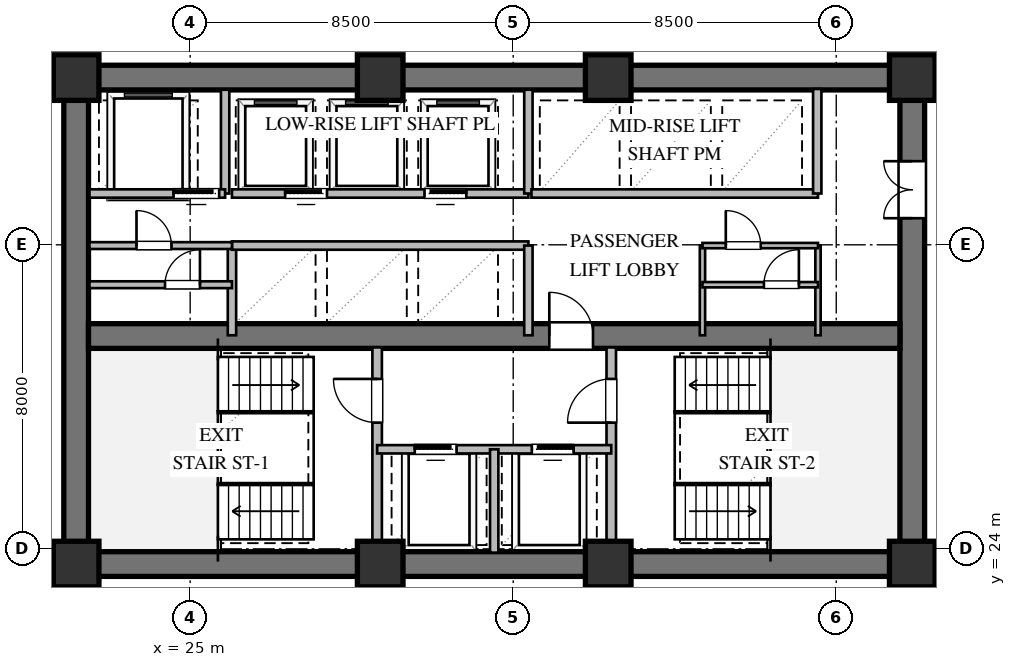
"""IFC4 building model, lengths in metres.
Left out: names, types, materials, properties, quantities, classifications, styles, units other than length and angle.
Written with IfcOpenShell. Run it as: python <this file> out.ifc"""

import sys

from ifc_helpers import new_model, si_unit, direction, frame, frame_2d, origin, origin_2d, place, context, subcontext, project, spatial, rectangle, extrude, element, fill, save


model = new_model("IFC4")
c1 = context("Model", 3, precision=1e-05, world=origin(), true_north=direction((0.0, 1.0)))
c2 = subcontext(c1, "Body", "Model", "MODEL_VIEW")
j1 = project(units=[si_unit("LENGTHUNIT", "METRE"), si_unit("PLANEANGLEUNIT", "RADIAN")], contexts=[c1])
p1 = place(None, origin())
s1 = spatial("IfcSite", under=j1, at=p1, CompositionType="ELEMENT")
p2 = place(p1, origin())
s2 = spatial("IfcBuilding", under=s1, at=p2, CompositionType="ELEMENT")
p3 = place(p2, frame((0.0, 0.0, 42.0)))
s3 = spatial("IfcBuildingStorey", under=s2, at=p3, CompositionType="ELEMENT", Elevation=42.0)
for number, where, z_axis, x_axis in (
    (1, (21.675, 23.6, 0.0), (0.0, 0.0, 1.0), (1.0, 0.0, 0.0)),
    (2, (21.675, 36.4, 0.0), (0.0, 0.0, 1.0), (1.0, 0.0, 0.0)),
):
    element("IfcWall", number, at=place(p3, frame(where, z_axis=z_axis, x_axis=x_axis)), inside=s3, PredefinedType="SHEAR", context=c2, shape_type="SweptSolid", body=[
        extrude(rectangle(XDim=22.65, YDim=0.65, at=frame_2d((11.325, 0.0))), origin(), (0.0, 0.0, 1.0), 3.36),
    ])
p4 = place(p3, frame((22.0, 23.925, 0.0), z_axis=(0.0, 0.0, 1.0), x_axis=(0.0, 1.0, 0.0)))
e3 = element("IfcWall", 3, at=p4, inside=s3, PredefinedType="SHEAR", context=c2, shape_type="SweptSolid", body=[
    extrude(rectangle(XDim=12.15, YDim=0.65, at=frame_2d((6.075, 0.0))), origin(), (0.0, 0.0, 1.0), 3.36),
])
p5 = place(p3, frame((44.0, 23.925, 0.0), z_axis=(0.0, 0.0, 1.0), x_axis=(0.0, 1.0, 0.0)))
e4 = element("IfcWall", 4, at=p5, inside=s3, PredefinedType="SHEAR", context=c2, shape_type="SweptSolid", body=[
    extrude(rectangle(XDim=12.15, YDim=0.65, at=frame_2d((6.075, 0.0))), origin(), (0.0, 0.0, 1.0), 3.36),
])
p6 = place(p5, frame((8.775, 0.0, 0.0)))
e5 = element("IfcOpeningElement", 5, at=p6, cuts=e4, PredefinedType="OPENING", context=c2, shape_type="SweptSolid", body=[
    extrude(rectangle(XDim=1.5, YDim=2.15, at=frame_2d((0.75, 1.075))), frame((0.0, 0.335, 0.0), z_axis=(0.0, -1.0, 0.0), x_axis=(1.0, 0.0, 0.0)), (0.0, 0.0, 1.0), 0.67),
])
p7 = place(p3, frame((22.325, 29.6, 0.0), z_axis=(0.0, 0.0, 1.0), x_axis=(1.0, 0.0, 0.0)))
e6 = element("IfcWall", 6, at=p7, inside=s3, PredefinedType="SHEAR", context=c2, shape_type="SweptSolid", body=[
    extrude(rectangle(XDim=21.35, YDim=0.65, at=frame_2d((10.675, 0.0))), origin(), (0.0, 0.0, 1.0), 3.36),
])
p8 = place(p7, frame((12.125, 0.0, 0.0)))
e7 = element("IfcOpeningElement", 7, at=p8, cuts=e6, PredefinedType="OPENING", context=c2, shape_type="SweptSolid", body=[
    extrude(rectangle(XDim=1.15, YDim=2.1, at=frame_2d((0.575, 1.05))), frame((0.0, 0.335, 0.0), z_axis=(0.0, -1.0, 0.0), x_axis=(1.0, 0.0, 0.0)), (0.0, 0.0, 1.0), 0.67),
])
for number, where, z_axis, x_axis in (
    (8, (22.0, 23.6, 0.0), (0.0, 0.0, 1.0), (1.0, 0.0, 0.0)),
    (9, (30.0, 23.6, 0.0), (0.0, 0.0, 1.0), (1.0, 0.0, 0.0)),
    (10, (36.0, 23.6, 0.0), (0.0, 0.0, 1.0), (1.0, 0.0, 0.0)),
    (11, (44.0, 23.6, 0.0), (0.0, 0.0, 1.0), (1.0, 0.0, 0.0)),
    (12, (44.0, 36.4, 0.0), (0.0, 0.0, 1.0), (1.0, 0.0, 0.0)),
    (13, (36.0, 36.4, 0.0), (0.0, 0.0, 1.0), (1.0, 0.0, 0.0)),
    (14, (30.0, 36.4, 0.0), (0.0, 0.0, 1.0), (1.0, 0.0, 0.0)),
    (15, (22.0, 36.4, 0.0), (0.0, 0.0, 1.0), (1.0, 0.0, 0.0)),
):
    element("IfcColumn", number, at=place(p3, frame(where, z_axis=z_axis, x_axis=x_axis)), inside=s3, PredefinedType="COLUMN", context=c2, shape_type="SweptSolid", body=[
        extrude(rectangle(XDim=1.2, YDim=1.2, at=origin_2d()), origin(), (0.0, 0.0, 1.0), 3.6),
    ])
p9 = place(p3, frame((29.92, 23.9, 0.0), z_axis=(0.0, 0.0, 1.0), x_axis=(0.0, 1.0, 0.0)))
e16 = element("IfcWall", 16, at=p9, inside=s3, PredefinedType="SOLIDWALL", context=c2, shape_type="SweptSolid", body=[
    extrude(rectangle(XDim=5.4, YDim=0.25, at=frame_2d((2.7, 0.0))), origin(), (0.0, 0.0, 1.0), 3.36),
])
p10 = place(p9, frame((3.421, 0.0, 0.0)))
e17 = element("IfcOpeningElement", 17, at=p10, cuts=e16, PredefinedType="OPENING", context=c2, shape_type="SweptSolid", body=[
    extrude(rectangle(XDim=1.15, YDim=2.1, at=frame_2d((0.575, 1.05))), frame((0.0, 0.135, 0.0), z_axis=(0.0, -1.0, 0.0), x_axis=(1.0, 0.0, 0.0)), (0.0, 0.0, 1.0), 0.27),
])
p11 = place(p3, frame((36.08, 23.9, 0.0), z_axis=(0.0, 0.0, 1.0), x_axis=(0.0, 1.0, 0.0)))
e18 = element("IfcWall", 18, at=p11, inside=s3, PredefinedType="SOLIDWALL", context=c2, shape_type="SweptSolid", body=[
    extrude(rectangle(XDim=5.4, YDim=0.25, at=frame_2d((2.7, 0.0))), origin(), (0.0, 0.0, 1.0), 3.36),
])
p12 = place(p11, frame((3.421, 0.0, 0.0)))
e19 = element("IfcOpeningElement", 19, at=p12, cuts=e18, PredefinedType="OPENING", context=c2, shape_type="SweptSolid", body=[
    extrude(rectangle(XDim=1.15, YDim=2.1, at=frame_2d((0.575, 1.05))), frame((0.0, 0.135, 0.0), z_axis=(0.0, -1.0, 0.0), x_axis=(1.0, 0.0, 0.0)), (0.0, 0.0, 1.0), 0.27),
])
p13 = place(p3, frame((29.92, 26.62, 0.0), z_axis=(0.0, 0.0, 1.0), x_axis=(1.0, 0.0, 0.0)))
e20 = element("IfcWall", 20, at=p13, inside=s3, PredefinedType="SOLIDWALL", context=c2, shape_type="SweptSolid", body=[
    extrude(rectangle(XDim=6.16, YDim=0.22, at=frame_2d((3.08, 0.0))), origin(), (0.0, 0.0, 1.0), 3.36),
])
p14 = place(p13, frame((0.99, 0.0, 0.0)))
e21 = element("IfcOpeningElement", 21, at=p14, cuts=e20, PredefinedType="OPENING", context=c2, shape_type="SweptSolid", body=[
    extrude(rectangle(XDim=1.1, YDim=2.1, at=frame_2d((0.55, 1.05))), frame((0.0, 0.12, 0.0), z_axis=(0.0, -1.0, 0.0), x_axis=(1.0, 0.0, 0.0)), (0.0, 0.0, 1.0), 0.24),
])
p15 = place(p13, frame((4.07, 0.0, 0.0)))
e22 = element("IfcOpeningElement", 22, at=p15, cuts=e20, PredefinedType="OPENING", context=c2, shape_type="SweptSolid", body=[
    extrude(rectangle(XDim=1.1, YDim=2.1, at=frame_2d((0.55, 1.05))), frame((0.0, 0.12, 0.0), z_axis=(0.0, -1.0, 0.0), x_axis=(1.0, 0.0, 0.0)), (0.0, 0.0, 1.0), 0.24),
])
p16 = place(p3, frame((33.0, 23.9, 0.0), z_axis=(0.0, 0.0, 1.0), x_axis=(0.0, 1.0, 0.0)))
e23 = element("IfcWall", 23, at=p16, inside=s3, PredefinedType="SOLIDWALL", context=c2, shape_type="SweptSolid", body=[
    extrude(rectangle(XDim=2.72, YDim=0.22, at=frame_2d((1.36, 0.0))), origin(), (0.0, 0.0, 1.0), 3.36),
])
p17 = place(p3, frame((25.92, 33.35, 0.0), z_axis=(0.0, 0.0, 1.0), x_axis=(0.0, 1.0, 0.0)))
e24 = element("IfcWall", 24, at=p17, inside=s3, PredefinedType="SOLIDWALL", context=c2, shape_type="SweptSolid", body=[
    extrude(rectangle(XDim=2.73, YDim=0.22, at=frame_2d((1.365, 0.0))), origin(), (0.0, 0.0, 1.0), 3.36),
])
p18 = place(p3, frame((22.35, 33.35, 0.0), z_axis=(0.0, 0.0, 1.0), x_axis=(1.0, 0.0, 0.0)))
e25 = element("IfcWall", 25, at=p18, inside=s3, PredefinedType="SOLIDWALL", context=c2, shape_type="SweptSolid", body=[
    extrude(rectangle(XDim=3.57, YDim=0.22, at=frame_2d((1.785, 0.0))), origin(), (0.0, 0.0, 1.0), 3.36),
])
p19 = place(p18, frame((2.213, 0.0, 0.0)))
e26 = element("IfcOpeningElement", 26, at=p19, cuts=e25, PredefinedType="OPENING", context=c2, shape_type="SweptSolid", body=[
    extrude(rectangle(XDim=1.2, YDim=2.1, at=frame_2d((0.6, 1.05))), frame((0.0, 0.12, 0.0), z_axis=(0.0, -1.0, 0.0), x_axis=(1.0, 0.0, 0.0)), (0.0, 0.0, 1.0), 0.24),
])
p20 = place(p3, frame((26.1, 29.62, 0.0), z_axis=(0.0, 0.0, 1.0), x_axis=(0.0, 1.0, 0.0)))
e27 = element("IfcWall", 27, at=p20, inside=s3, PredefinedType="SOLIDWALL", context=c2, shape_type="SweptSolid", body=[
    extrude(rectangle(XDim=2.36, YDim=0.22, at=frame_2d((1.18, 0.0))), origin(), (0.0, 0.0, 1.0), 3.36),
])
p21 = place(p3, frame((26.1, 31.98, 0.0), z_axis=(0.0, 0.0, 1.0), x_axis=(1.0, 0.0, 0.0)))
e28 = element("IfcWall", 28, at=p21, inside=s3, PredefinedType="SOLIDWALL", context=c2, shape_type="SweptSolid", body=[
    extrude(rectangle(XDim=7.8, YDim=0.22, at=frame_2d((3.9, 0.0))), origin(), (0.0, 0.0, 1.0), 3.36),
])
p22 = place(p3, frame((33.9, 29.62, 0.0), z_axis=(0.0, 0.0, 1.0), x_axis=(0.0, 1.0, 0.0)))
e29 = element("IfcWall", 29, at=p22, inside=s3, PredefinedType="SOLIDWALL", context=c2, shape_type="SweptSolid", body=[
    extrude(rectangle(XDim=2.36, YDim=0.22, at=frame_2d((1.18, 0.0))), origin(), (0.0, 0.0, 1.0), 3.36),
])
p23 = place(p3, frame((26.1, 33.35, 0.0), z_axis=(0.0, 0.0, 1.0), x_axis=(1.0, 0.0, 0.0)))
e30 = element("IfcWall", 30, at=p23, inside=s3, PredefinedType="SOLIDWALL", context=c2, shape_type="SweptSolid", body=[
    extrude(rectangle(XDim=7.8, YDim=0.22, at=frame_2d((3.9, 0.0))), origin(), (0.0, 0.0, 1.0), 3.36),
])
p24 = place(p23, frame((1.4, 0.0, 0.0)))
e31 = element("IfcOpeningElement", 31, at=p24, cuts=e30, PredefinedType="OPENING", context=c2, shape_type="SweptSolid", body=[
    extrude(rectangle(XDim=1.1, YDim=2.1, at=frame_2d((0.55, 1.05))), frame((0.0, 0.12, 0.0), z_axis=(0.0, -1.0, 0.0), x_axis=(1.0, 0.0, 0.0)), (0.0, 0.0, 1.0), 0.24),
])
p25 = place(p23, frame((5.066, 0.0, 0.0)))
e32 = element("IfcOpeningElement", 32, at=p25, cuts=e30, PredefinedType="OPENING", context=c2, shape_type="SweptSolid", body=[
    extrude(rectangle(XDim=1.1, YDim=2.1, at=frame_2d((0.55, 1.05))), frame((0.0, 0.12, 0.0), z_axis=(0.0, -1.0, 0.0), x_axis=(1.0, 0.0, 0.0)), (0.0, 0.0, 1.0), 0.24),
])
p26 = place(p3, frame((33.9, 33.35, 0.0), z_axis=(0.0, 0.0, 1.0), x_axis=(0.0, 1.0, 0.0)))
e33 = element("IfcWall", 33, at=p26, inside=s3, PredefinedType="SOLIDWALL", context=c2, shape_type="SweptSolid", body=[
    extrude(rectangle(XDim=2.73, YDim=0.22, at=frame_2d((1.365, 0.0))), origin(), (0.0, 0.0, 1.0), 3.36),
])
p27 = place(p3, frame((33.98, 33.35, 0.0), z_axis=(0.0, 0.0, 1.0), x_axis=(1.0, 0.0, 0.0)))
e34 = element("IfcWall", 34, at=p27, inside=s3, PredefinedType="SOLIDWALL", context=c2, shape_type="SweptSolid", body=[
    extrude(rectangle(XDim=7.54, YDim=0.22, at=frame_2d((3.77, 0.0))), origin(), (0.0, 0.0, 1.0), 3.36),
])
p28 = place(p3, frame((41.5, 33.35, 0.0), z_axis=(0.0, 0.0, 1.0), x_axis=(0.0, 1.0, 0.0)))
e35 = element("IfcWall", 35, at=p28, inside=s3, PredefinedType="SOLIDWALL", context=c2, shape_type="SweptSolid", body=[
    extrude(rectangle(XDim=2.75, YDim=0.22, at=frame_2d((1.375, 0.0))), origin(), (0.0, 0.0, 1.0), 3.36),
])
p29 = place(p3, frame((22.35, 30.95, 0.0), z_axis=(0.0, 0.0, 1.0), x_axis=(1.0, 0.0, 0.0)))
e36 = element("IfcWall", 36, at=p29, inside=s3, PredefinedType="PARTITIONING", context=c2, shape_type="SweptSolid", body=[
    extrude(rectangle(XDim=3.75, YDim=0.18, at=frame_2d((1.875, 0.0))), origin(), (0.0, 0.0, 1.0), 3.36),
])
p30 = place(p29, frame((1.988, 0.0, 0.0)))
e37 = element("IfcOpeningElement", 37, at=p30, cuts=e36, PredefinedType="OPENING", context=c2, shape_type="SweptSolid", body=[
    extrude(rectangle(XDim=0.92, YDim=2.1, at=frame_2d((0.46, 1.05))), frame((0.0, 0.1, 0.0), z_axis=(0.0, -1.0, 0.0), x_axis=(1.0, 0.0, 0.0)), (0.0, 0.0, 1.0), 0.2),
])
p31 = place(p3, frame((22.35, 31.98, 0.0), z_axis=(0.0, 0.0, 1.0), x_axis=(1.0, 0.0, 0.0)))
e38 = element("IfcWall", 38, at=p31, inside=s3, PredefinedType="PARTITIONING", context=c2, shape_type="SweptSolid", body=[
    extrude(rectangle(XDim=3.75, YDim=0.18, at=frame_2d((1.875, 0.0))), origin(), (0.0, 0.0, 1.0), 3.36),
])
p32 = place(p31, frame((1.238, 0.0, 0.0)))
e39 = element("IfcOpeningElement", 39, at=p32, cuts=e38, PredefinedType="OPENING", context=c2, shape_type="SweptSolid", body=[
    extrude(rectangle(XDim=0.92, YDim=2.1, at=frame_2d((0.46, 1.05))), frame((0.0, 0.1, 0.0), z_axis=(0.0, -1.0, 0.0), x_axis=(1.0, 0.0, 0.0)), (0.0, 0.0, 1.0), 0.2),
])
for number, where, z_axis, x_axis in (
    (40, (38.48, 29.62, 0.0), (0.0, 0.0, 1.0), (0.0, 1.0, 0.0)),
    (41, (41.52, 29.62, 0.0), (0.0, 0.0, 1.0), (0.0, 1.0, 0.0)),
):
    element("IfcWall", number, at=place(p3, frame(where, z_axis=z_axis, x_axis=x_axis)), inside=s3, PredefinedType="PARTITIONING", context=c2, shape_type="SweptSolid", body=[
        extrude(rectangle(XDim=2.36, YDim=0.14, at=frame_2d((1.18, 0.0))), origin(), (0.0, 0.0, 1.0), 3.36),
    ])
p33 = place(p3, frame((38.48, 30.95, 0.0), z_axis=(0.0, 0.0, 1.0), x_axis=(1.0, 0.0, 0.0)))
e42 = element("IfcWall", 42, at=p33, inside=s3, PredefinedType="PARTITIONING", context=c2, shape_type="SweptSolid", body=[
    extrude(rectangle(XDim=3.04, YDim=0.14, at=frame_2d((1.52, 0.0))), origin(), (0.0, 0.0, 1.0), 3.36),
])
p34 = place(p33, frame((1.617, 0.0, 0.0)))
e43 = element("IfcOpeningElement", 43, at=p34, cuts=e42, PredefinedType="OPENING", context=c2, shape_type="SweptSolid", body=[
    extrude(rectangle(XDim=0.92, YDim=2.1, at=frame_2d((0.46, 1.05))), frame((0.0, 0.08, 0.0), z_axis=(0.0, -1.0, 0.0), x_axis=(1.0, 0.0, 0.0)), (0.0, 0.0, 1.0), 0.16),
])
p35 = place(p3, frame((38.48, 31.98, 0.0), z_axis=(0.0, 0.0, 1.0), x_axis=(1.0, 0.0, 0.0)))
e44 = element("IfcWall", 44, at=p35, inside=s3, PredefinedType="PARTITIONING", context=c2, shape_type="SweptSolid", body=[
    extrude(rectangle(XDim=3.04, YDim=0.14, at=frame_2d((1.52, 0.0))), origin(), (0.0, 0.0, 1.0), 3.36),
])
p36 = place(p35, frame((0.614, 0.0, 0.0)))
e45 = element("IfcOpeningElement", 45, at=p36, cuts=e44, PredefinedType="OPENING", context=c2, shape_type="SweptSolid", body=[
    extrude(rectangle(XDim=0.92, YDim=2.1, at=frame_2d((0.46, 1.05))), frame((0.0, 0.08, 0.0), z_axis=(0.0, -1.0, 0.0), x_axis=(1.0, 0.0, 0.0)), (0.0, 0.0, 1.0), 0.16),
])
p37 = place(p10, origin())
e46 = element("IfcDoor", 46, at=p37, inside=s3, OperationType="SINGLE_SWING_RIGHT", PredefinedType="DOOR", context=c2, shape_type="SweptSolid", body=[
    extrude(rectangle(XDim=1.15, YDim=2.1, at=frame_2d((0.575, 1.05))), frame((0.0, 0.025, 0.0), z_axis=(0.0, -1.0, 0.0), x_axis=(1.0, 0.0, 0.0)), (0.0, 0.0, 1.0), 0.05),
])
fill(e17, e46)
p38 = place(p12, origin())
e47 = element("IfcDoor", 47, at=p38, inside=s3, OperationType="SINGLE_SWING_LEFT", PredefinedType="DOOR", context=c2, shape_type="SweptSolid", body=[
    extrude(rectangle(XDim=1.15, YDim=2.1, at=frame_2d((0.575, 1.05))), frame((0.0, 0.025, 0.0), z_axis=(0.0, -1.0, 0.0), x_axis=(1.0, 0.0, 0.0)), (0.0, 0.0, 1.0), 0.05),
])
fill(e19, e47)
p39 = place(p14, origin())
e48 = element("IfcDoor", 48, at=p39, inside=s3, OperationType="SLIDING_TO_LEFT", PredefinedType="DOOR", context=c2, shape_type="SweptSolid", body=[
    extrude(rectangle(XDim=1.1, YDim=2.1, at=frame_2d((0.55, 1.05))), frame((0.0, 0.025, 0.0), z_axis=(0.0, -1.0, 0.0), x_axis=(1.0, 0.0, 0.0)), (0.0, 0.0, 1.0), 0.05),
])
fill(e21, e48)
p40 = place(p15, origin())
e49 = element("IfcDoor", 49, at=p40, inside=s3, OperationType="SLIDING_TO_RIGHT", PredefinedType="DOOR", context=c2, shape_type="SweptSolid", body=[
    extrude(rectangle(XDim=1.1, YDim=2.1, at=frame_2d((0.55, 1.05))), frame((0.0, 0.025, 0.0), z_axis=(0.0, -1.0, 0.0), x_axis=(1.0, 0.0, 0.0)), (0.0, 0.0, 1.0), 0.05),
])
fill(e22, e49)
p41 = place(p8, origin())
e50 = element("IfcDoor", 50, at=p41, inside=s3, OperationType="SINGLE_SWING_LEFT", PredefinedType="DOOR", context=c2, shape_type="SweptSolid", body=[
    extrude(rectangle(XDim=1.15, YDim=2.1, at=frame_2d((0.575, 1.05))), frame((0.0, 0.025, 0.0), z_axis=(0.0, -1.0, 0.0), x_axis=(1.0, 0.0, 0.0)), (0.0, 0.0, 1.0), 0.05),
])
fill(e7, e50)
p42 = place(p6, origin())
e51 = element("IfcDoor", 51, at=p42, inside=s3, OperationType="DOUBLE_DOOR_SINGLE_SWING", PredefinedType="DOOR", context=c2, shape_type="SweptSolid", body=[
    extrude(rectangle(XDim=1.5, YDim=2.15, at=frame_2d((0.75, 1.075))), frame((0.0, 0.025, 0.0), z_axis=(0.0, -1.0, 0.0), x_axis=(1.0, 0.0, 0.0)), (0.0, 0.0, 1.0), 0.05),
])
fill(e5, e51)
p43 = place(p19, origin())
e52 = element("IfcDoor", 52, at=p43, inside=s3, OperationType="SLIDING_TO_LEFT", PredefinedType="DOOR", context=c2, shape_type="SweptSolid", body=[
    extrude(rectangle(XDim=1.2, YDim=2.1, at=frame_2d((0.6, 1.05))), frame((0.0, 0.025, 0.0), z_axis=(0.0, -1.0, 0.0), x_axis=(1.0, 0.0, 0.0)), (0.0, 0.0, 1.0), 0.05),
])
fill(e26, e52)
p44 = place(p24, origin())
e53 = element("IfcDoor", 53, at=p44, inside=s3, OperationType="SLIDING_TO_LEFT", PredefinedType="DOOR", context=c2, shape_type="SweptSolid", body=[
    extrude(rectangle(XDim=1.1, YDim=2.1, at=frame_2d((0.55, 1.05))), frame((0.0, 0.025, 0.0), z_axis=(0.0, -1.0, 0.0), x_axis=(1.0, 0.0, 0.0)), (0.0, 0.0, 1.0), 0.05),
])
fill(e31, e53)
p45 = place(p25, origin())
e54 = element("IfcDoor", 54, at=p45, inside=s3, OperationType="SLIDING_TO_RIGHT", PredefinedType="DOOR", context=c2, shape_type="SweptSolid", body=[
    extrude(rectangle(XDim=1.1, YDim=2.1, at=frame_2d((0.55, 1.05))), frame((0.0, 0.025, 0.0), z_axis=(0.0, -1.0, 0.0), x_axis=(1.0, 0.0, 0.0)), (0.0, 0.0, 1.0), 0.05),
])
fill(e32, e54)
p46 = place(p32, origin())
e55 = element("IfcDoor", 55, at=p46, inside=s3, OperationType="SINGLE_SWING_LEFT", PredefinedType="DOOR", context=c2, shape_type="SweptSolid", body=[
    extrude(rectangle(XDim=0.92, YDim=2.1, at=frame_2d((0.46, 1.05))), frame((0.0, 0.025, 0.0), z_axis=(0.0, -1.0, 0.0), x_axis=(1.0, 0.0, 0.0)), (0.0, 0.0, 1.0), 0.05),
])
fill(e39, e55)
p47 = place(p30, origin())
e56 = element("IfcDoor", 56, at=p47, inside=s3, OperationType="SINGLE_SWING_RIGHT", PredefinedType="DOOR", context=c2, shape_type="SweptSolid", body=[
    extrude(rectangle(XDim=0.92, YDim=2.1, at=frame_2d((0.46, 1.05))), frame((0.0, 0.025, 0.0), z_axis=(0.0, -1.0, 0.0), x_axis=(1.0, 0.0, 0.0)), (0.0, 0.0, 1.0), 0.05),
])
fill(e37, e56)
p48 = place(p36, origin())
e57 = element("IfcDoor", 57, at=p48, inside=s3, OperationType="SINGLE_SWING_LEFT", PredefinedType="DOOR", context=c2, shape_type="SweptSolid", body=[
    extrude(rectangle(XDim=0.92, YDim=2.1, at=frame_2d((0.46, 1.05))), frame((0.0, 0.025, 0.0), z_axis=(0.0, -1.0, 0.0), x_axis=(1.0, 0.0, 0.0)), (0.0, 0.0, 1.0), 0.05),
])
fill(e45, e57)
p49 = place(p34, origin())
e58 = element("IfcDoor", 58, at=p49, inside=s3, OperationType="SINGLE_SWING_RIGHT", PredefinedType="DOOR", context=c2, shape_type="SweptSolid", body=[
    extrude(rectangle(XDim=0.92, YDim=2.1, at=frame_2d((0.46, 1.05))), frame((0.0, 0.025, 0.0), z_axis=(0.0, -1.0, 0.0), x_axis=(1.0, 0.0, 0.0)), (0.0, 0.0, 1.0), 0.05),
])
fill(e43, e58)
save(model, sys.argv[1])
